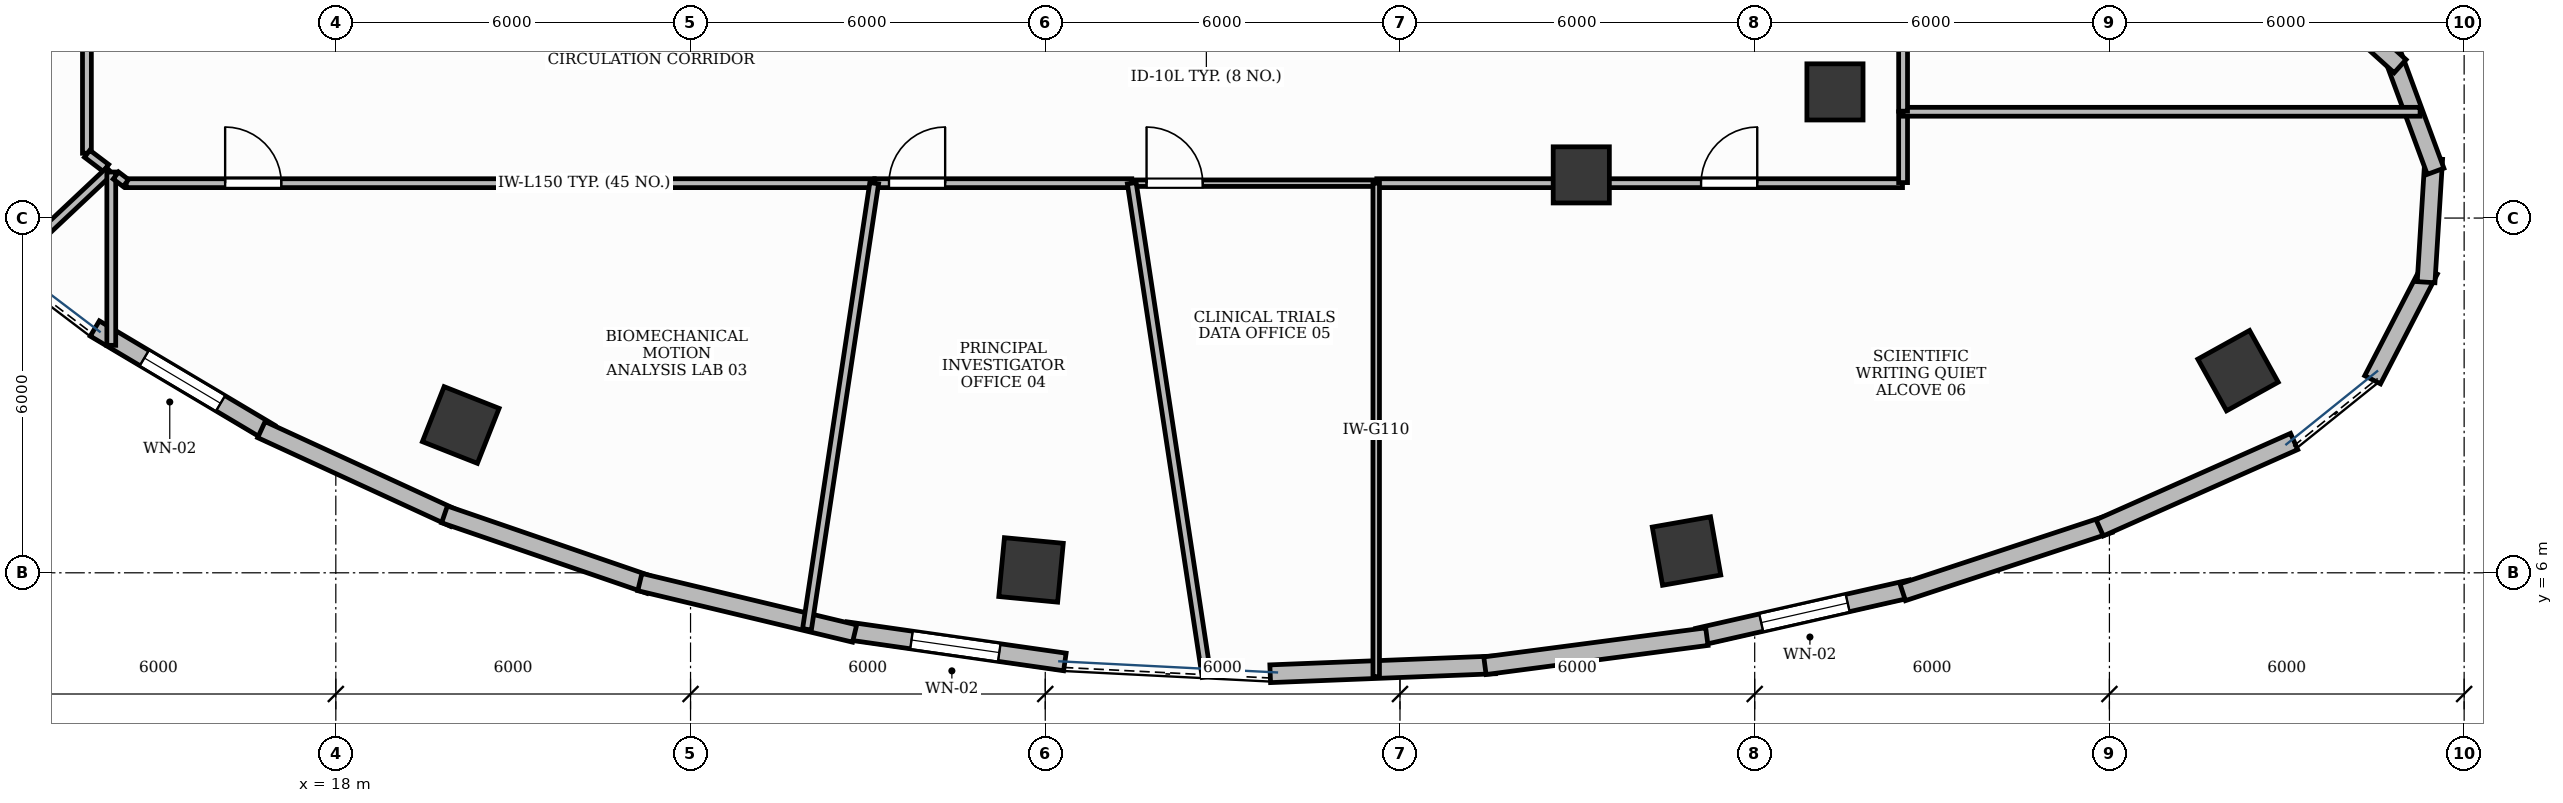
"""IFC4 building model, lengths in metres.
Left out: names, types, materials, properties, quantities, classifications, styles, units other than length and angle.
Written with IfcOpenShell. Run it as: python <this file> out.ifc"""

import sys

from ifc_helpers import new_model, si_unit, direction, frame, frame_2d, origin, origin_2d, place, context, subcontext, project, spatial, rectangle, extrude, element, fill, save


model = new_model("IFC4")
c1 = context("Model", 3, precision=1e-05, world=origin(), true_north=direction((0.0, 1.0)))
c2 = subcontext(c1, "Body", "Model", "MODEL_VIEW")
j1 = project(units=[si_unit("LENGTHUNIT", "METRE"), si_unit("PLANEANGLEUNIT", "RADIAN")], contexts=[c1])
p1 = place(None, origin())
s1 = spatial("IfcSite", under=j1, at=p1, CompositionType="ELEMENT")
p2 = place(p1, origin())
s2 = spatial("IfcBuilding", under=s1, at=p2, CompositionType="ELEMENT")
p3 = place(p2, frame((0.0, 0.0, 235.2)))
s3 = spatial("IfcBuildingStorey", under=s2, at=p3, CompositionType="ELEMENT", Elevation=235.2)
for number, where, z_axis, x_axis in (
    (1, (20.113, 8.5, -0.0), (0.0, 0.0, 1.0), (-0.93, 0.367, 0.0)),
    (2, (29.759, 6.049, -0.0), (0.0, 0.0, 1.0), (-0.995, 0.095, 0.0)),
    (3, (40.847, 6.368, -0.0), (0.0, 0.0, 1.0), (0.985, 0.173, 0.0)),
):
    element("IfcColumn", number, at=place(p3, frame(where, z_axis=z_axis, x_axis=x_axis)), inside=s3, PredefinedType="COLUMN", context=c2, shape_type="SweptSolid", body=[
        extrude(rectangle(XDim=1.0, YDim=1.0, at=origin_2d()), origin(), (0.0, 0.0, 1.0), 3.901),
    ])
p4 = place(p3, frame((39.067, 12.73, -0.0), z_axis=(0.0, 0.0, 1.0), x_axis=(1.0, 0.0, 0.0)))
e4 = element("IfcColumn", 4, at=p4, inside=s3, PredefinedType="COLUMN", context=c2, shape_type="SweptSolid", body=[
    extrude(rectangle(XDim=0.95, YDim=0.95, at=origin_2d()), origin(), (0.0, 0.0, 1.0), 3.901),
])
p5 = place(p3, frame((50.176, 9.419, -0.0), z_axis=(0.0, 0.0, 1.0), x_axis=(0.874535078577, 0.484962262797, 0.0)))
e5 = element("IfcColumn", 5, at=p5, inside=s3, PredefinedType="COLUMN", context=c2, shape_type="SweptSolid", body=[
    extrude(rectangle(XDim=1.0, YDim=1.0, at=origin_2d()), origin(), (0.0, 0.0, 1.0), 3.901),
])
p6 = place(p3, frame((43.358, 14.134, -0.0), z_axis=(0.0, 0.0, 1.0), x_axis=(1.0, 0.0, 0.0)))
e6 = element("IfcColumn", 6, at=p6, inside=s3, PredefinedType="COLUMN", context=c2, shape_type="SweptSolid", body=[
    extrude(rectangle(XDim=0.95, YDim=0.95, at=origin_2d()), origin(), (0.0, 0.0, 1.0), 3.901),
])
p7 = place(p3, frame((13.923, 10.132, 0.0), z_axis=(0.0, 0.0, 1.0), x_axis=(0.859459434124, -0.511203952543, 0.0)))
e7 = element("IfcWall", 7, at=p7, inside=s3, PredefinedType="STANDARD", context=c2, shape_type="SweptSolid", body=[
    extrude(rectangle(XDim=3.45, YDim=0.3, at=frame_2d((1.725, 0.0))), origin(), (0.0, 0.0, 1.0), 3.9),
])
p8 = place(p7, frame((0.975, 0.0, 0.95)))
e8 = element("IfcOpeningElement", 8, at=p8, cuts=e7, PredefinedType="OPENING", context=c2, shape_type="SweptSolid", body=[
    extrude(rectangle(XDim=1.5, YDim=1.8, at=frame_2d((0.75, 0.9))), frame((0.0, 0.165, 0.0), z_axis=(0.0, -1.0, 0.0), x_axis=(1.0, 0.0, 0.0)), (0.0, 0.0, 1.0), 0.33),
])
p9 = place(p3, frame((26.628, 5.022, 0.0), z_axis=(0.0, 0.0, 1.0), x_axis=(0.989905072127, -0.14173195891, 0.0)))
e9 = element("IfcWall", 9, at=p9, inside=s3, PredefinedType="STANDARD", context=c2, shape_type="SweptSolid", body=[
    extrude(rectangle(XDim=3.741, YDim=0.3, at=frame_2d((1.871, 0.0))), origin(), (0.0, 0.0, 1.0), 3.9),
])
p10 = place(p9, frame((1.121, 0.0, 0.95)))
e10 = element("IfcOpeningElement", 10, at=p10, cuts=e9, PredefinedType="OPENING", context=c2, shape_type="SweptSolid", body=[
    extrude(rectangle(XDim=1.5, YDim=1.8, at=frame_2d((0.75, 0.9))), frame((0.0, 0.165, 0.0), z_axis=(0.0, -1.0, 0.0), x_axis=(1.0, 0.0, 0.0)), (0.0, 0.0, 1.0), 0.33),
])
p11 = place(p3, frame((41.036, 4.914, 0.0), z_axis=(0.0, 0.0, 1.0), x_axis=(0.975237678872, 0.221159376263, 0.0)))
e11 = element("IfcWall", 11, at=p11, inside=s3, PredefinedType="STANDARD", context=c2, shape_type="SweptSolid", body=[
    extrude(rectangle(XDim=3.703, YDim=0.3, at=frame_2d((1.851, 0.0))), origin(), (0.0, 0.0, 1.0), 3.9),
])
p12 = place(p11, frame((1.101, 0.0, 0.95)))
e12 = element("IfcOpeningElement", 12, at=p12, cuts=e11, PredefinedType="OPENING", context=c2, shape_type="SweptSolid", body=[
    extrude(rectangle(XDim=1.5, YDim=1.8, at=frame_2d((0.75, 0.9))), frame((0.0, 0.165, 0.0), z_axis=(0.0, -1.0, 0.0), x_axis=(1.0, 0.0, 0.0)), (0.0, 0.0, 1.0), 0.33),
])
p13 = place(p3, frame((16.741, 8.422, 0.0), z_axis=(0.0, 0.0, 1.0), x_axis=(0.908506474671, -0.417870776055, 0.0)))
e13 = element("IfcWall", 13, at=p13, inside=s3, PredefinedType="STANDARD", context=c2, shape_type="SweptSolid", body=[
    extrude(rectangle(XDim=3.587, YDim=0.3, at=frame_2d((1.793, 0.0))), origin(), (0.0, 0.0, 1.0), 3.47),
])
p14 = place(p3, frame((19.838, 6.988, 0.0), z_axis=(0.0, 0.0, 1.0), x_axis=(0.945722383555, -0.32497565023, 0.0)))
e14 = element("IfcWall", 14, at=p14, inside=s3, PredefinedType="STANDARD", context=c2, shape_type="SweptSolid", body=[
    extrude(rectangle(XDim=3.67, YDim=0.3, at=frame_2d((1.835, 0.0))), origin(), (0.0, 0.0, 1.0), 3.9),
])
p15 = place(p3, frame((23.143, 5.843, 0.0), z_axis=(0.0, 0.0, 1.0), x_axis=(0.972475629939, -0.233004611918, 0.0)))
e15 = element("IfcWall", 15, at=p15, inside=s3, PredefinedType="STANDARD", context=c2, shape_type="SweptSolid", body=[
    extrude(rectangle(XDim=3.735, YDim=0.3, at=frame_2d((1.868, 0.0))), origin(), (0.0, 0.0, 1.0), 3.9),
])
p16 = place(p3, frame((33.805, 4.292, 0.0), z_axis=(0.0, 0.0, 1.0), x_axis=(0.999221923177, 0.039440439173, 0.0)))
e16 = element("IfcWall", 16, at=p16, inside=s3, PredefinedType="STANDARD", context=c2, shape_type="SweptSolid", body=[
    extrude(rectangle(XDim=3.807, YDim=0.3, at=frame_2d((1.903, 0.0))), origin(), (0.0, 0.0, 1.0), 3.9),
])
p17 = place(p3, frame((37.437, 4.428, 0.0), z_axis=(0.0, 0.0, 1.0), x_axis=(0.991512801574, 0.130009093201, 0.0)))
e17 = element("IfcWall", 17, at=p17, inside=s3, PredefinedType="STANDARD", context=c2, shape_type="SweptSolid", body=[
    extrude(rectangle(XDim=3.786, YDim=0.3, at=frame_2d((1.893, 0.0))), origin(), (0.0, 0.0, 1.0), 3.9),
])
p18 = place(p3, frame((44.504, 5.671, 0.0), z_axis=(0.0, 0.0, 1.0), x_axis=(0.94972655205, 0.313080622734, 0.0)))
e18 = element("IfcWall", 18, at=p18, inside=s3, PredefinedType="STANDARD", context=c2, shape_type="SweptSolid", body=[
    extrude(rectangle(XDim=3.679, YDim=0.3, at=frame_2d((1.84, 0.0))), origin(), (0.0, 0.0, 1.0), 3.9),
])
p19 = place(p3, frame((47.836, 6.761, 0.0), z_axis=(0.0, 0.0, 1.0), x_axis=(0.913940198441, 0.405848880341, 0.0)))
e19 = element("IfcWall", 19, at=p19, inside=s3, PredefinedType="STANDARD", context=c2, shape_type="SweptSolid", body=[
    extrude(rectangle(XDim=3.598, YDim=0.3, at=frame_2d((1.799, 0.0))), origin(), (0.0, 0.0, 1.0), 3.9),
])
p20 = place(p3, frame((52.452, 9.265, 0.0), z_axis=(0.0, 0.0, 1.0), x_axis=(0.459683297138, 0.888082916361, 0.0)))
e20 = element("IfcWall", 20, at=p20, inside=s3, PredefinedType="STANDARD", context=c2, shape_type="SweptSolid", body=[
    extrude(rectangle(XDim=2.092, YDim=0.3, at=frame_2d((1.046, 0.0))), origin(), (0.0, 0.0, 1.0), 3.9),
])
for number, where, z_axis, x_axis in (
    (21, (53.356, 10.915, 0.0), (0.0, 0.0, 1.0), (0.062, 0.998, 0.0)),
    (22, (53.517, 12.791, 0.0), (0.0, 0.0, 1.0), (-0.346, 0.938, 0.0)),
):
    element("IfcWall", number, at=place(p3, frame(where, z_axis=z_axis, x_axis=x_axis)), inside=s3, PredefinedType="STANDARD", context=c2, shape_type="SweptSolid", body=[
        extrude(rectangle(XDim=2.091, YDim=0.3, at=frame_2d((1.046, 0.0))), origin(), (0.0, 0.0, 1.0), 3.9),
    ])
p21 = place(p3, frame((52.917, 14.569, 0.0), z_axis=(0.0, 0.0, 1.0), x_axis=(-0.742037796493, 0.670358045059, 0.0)))
e23 = element("IfcWall", 23, at=p21, inside=s3, PredefinedType="STANDARD", context=c2, shape_type="SweptSolid", body=[
    extrude(rectangle(XDim=3.685, YDim=0.3, at=frame_2d((1.843, 0.0))), origin(), (0.0, 0.0, 1.0), 3.9),
])
p22 = place(p3, frame((13.79, 21.79, 0.0), z_axis=(0.0, 0.0, 1.0), x_axis=(0.0, -1.0, 0.0)))
e24 = element("IfcWall", 24, at=p22, inside=s3, PredefinedType="PARTITIONING", context=c2, shape_type="SweptSolid", body=[
    extrude(rectangle(XDim=8.694, YDim=0.15, at=frame_2d((4.347, 0.0))), origin(), (0.0, 0.0, 1.0), 2.91),
])
p23 = place(p22, frame((0.24, 0.0, 0.0)))
e25 = element("IfcOpeningElement", 25, at=p23, cuts=e24, PredefinedType="OPENING", context=c2, shape_type="SweptSolid", body=[
    extrude(rectangle(XDim=0.95, YDim=2.15, at=frame_2d((0.475, 1.075))), frame((0.0, 0.09, 0.0), z_axis=(0.0, -1.0, 0.0), x_axis=(1.0, 0.0, 0.0)), (0.0, 0.0, 1.0), 0.18),
])
p24 = place(p3, frame((14.454, 12.59, 0.0), z_axis=(0.0, 0.0, 1.0), x_axis=(1.0, 0.0, 0.0)))
e26 = element("IfcWall", 26, at=p24, inside=s3, PredefinedType="PARTITIONING", context=c2, shape_type="SweptSolid", body=[
    extrude(rectangle(XDim=12.652, YDim=0.15, at=frame_2d((6.326, 0.0))), origin(), (0.0, 0.0, 1.0), 2.91),
])
p25 = place(p24, frame((1.673, 0.0, 0.0)))
e27 = element("IfcOpeningElement", 27, at=p25, cuts=e26, PredefinedType="OPENING", context=c2, shape_type="SweptSolid", body=[
    extrude(rectangle(XDim=0.95, YDim=2.15, at=frame_2d((0.475, 1.075))), frame((0.0, 0.09, 0.0), z_axis=(0.0, -1.0, 0.0), x_axis=(1.0, 0.0, 0.0)), (0.0, 0.0, 1.0), 0.18),
])
p26 = place(p3, frame((27.117, 12.59, 0.0), z_axis=(0.0, 0.0, 1.0), x_axis=(1.0, 0.0, 0.0)))
e28 = element("IfcWall", 28, at=p26, inside=s3, PredefinedType="PARTITIONING", context=c2, shape_type="SweptSolid", body=[
    extrude(rectangle(XDim=4.347, YDim=0.15, at=frame_2d((2.173, 0.0))), origin(), (0.0, 0.0, 1.0), 2.91),
])
p27 = place(p26, frame((0.24, 0.0, 0.0)))
e29 = element("IfcOpeningElement", 29, at=p27, cuts=e28, PredefinedType="OPENING", context=c2, shape_type="SweptSolid", body=[
    extrude(rectangle(XDim=0.95, YDim=2.15, at=frame_2d((0.475, 1.075))), frame((0.0, 0.09, 0.0), z_axis=(0.0, -1.0, 0.0), x_axis=(1.0, 0.0, 0.0)), (0.0, 0.0, 1.0), 0.18),
])
p28 = place(p3, frame((31.473, 12.59, 0.0), z_axis=(0.0, 0.0, 1.0), x_axis=(1.0, 0.0, 0.0)))
e30 = element("IfcWall", 30, at=p28, inside=s3, PredefinedType="MOVABLE", context=c2, shape_type="SweptSolid", body=[
    extrude(rectangle(XDim=4.125, YDim=0.11, at=frame_2d((2.062, 0.0))), origin(), (0.0, 0.0, 1.0), 2.91),
])
p29 = place(p28, frame((0.24, 0.0, 0.0)))
e31 = element("IfcOpeningElement", 31, at=p29, cuts=e30, PredefinedType="OPENING", context=c2, shape_type="SweptSolid", body=[
    extrude(rectangle(XDim=0.95, YDim=2.15, at=frame_2d((0.475, 1.075))), frame((0.0, 0.07, 0.0), z_axis=(0.0, -1.0, 0.0), x_axis=(1.0, 0.0, 0.0)), (0.0, 0.0, 1.0), 0.14),
])
p30 = place(p3, frame((35.608, 12.59, 0.0), z_axis=(0.0, 0.0, 1.0), x_axis=(1.0, 0.0, 0.0)))
e32 = element("IfcWall", 32, at=p30, inside=s3, PredefinedType="PARTITIONING", context=c2, shape_type="SweptSolid", body=[
    extrude(rectangle(XDim=8.892, YDim=0.15, at=frame_2d((4.446, 0.0))), origin(), (0.0, 0.0, 1.0), 2.91),
])
p31 = place(p30, frame((5.485, 0.0, 0.0)))
e33 = element("IfcOpeningElement", 33, at=p31, cuts=e32, PredefinedType="OPENING", context=c2, shape_type="SweptSolid", body=[
    extrude(rectangle(XDim=0.95, YDim=2.15, at=frame_2d((0.475, 1.075))), frame((0.0, 0.09, 0.0), z_axis=(0.0, -1.0, 0.0), x_axis=(1.0, 0.0, 0.0)), (0.0, 0.0, 1.0), 0.18),
])
p32 = place(p3, frame((13.794, 13.088, 0.0), z_axis=(0.0, 0.0, 1.0), x_axis=(0.797056485175, -0.60390476024, 0.0)))
e34 = element("IfcWall", 34, at=p32, inside=s3, PredefinedType="PARTITIONING", context=c2, shape_type="SweptSolid", body=[
    extrude(rectangle(XDim=0.399, YDim=0.15, at=frame_2d((0.2, 0.0))), origin(), (0.0, 0.0, 1.0), 2.91),
])
p33 = place(p3, frame((14.175, 12.799, 0.0), z_axis=(0.0, 0.0, 1.0), x_axis=(-0.728528819482, -0.685015152521, 0.0)))
e35 = element("IfcWall", 35, at=p33, inside=s3, PredefinedType="PARTITIONING", context=c2, shape_type="SweptSolid", body=[
    extrude(rectangle(XDim=2.441, YDim=0.15, at=frame_2d((1.22, 0.0))), origin(), (0.0, 0.0, 1.0), 2.91),
])
p34 = place(p3, frame((14.202, 9.847, 0.0), z_axis=(0.0, 0.0, 1.0), x_axis=(0.0, 1.0, 0.0)))
e36 = element("IfcWall", 36, at=p34, inside=s3, PredefinedType="PARTITIONING", context=c2, shape_type="SweptSolid", body=[
    extrude(rectangle(XDim=2.931, YDim=0.15, at=frame_2d((1.466, 0.0))), origin(), (0.0, 0.0, 1.0), 2.91),
])
p35 = place(p3, frame((14.28, 12.72, 0.0), z_axis=(0.0, 0.0, 1.0), x_axis=(0.796940505815, -0.604057803683, 0.0)))
e37 = element("IfcWall", 37, at=p35, inside=s3, PredefinedType="PARTITIONING", context=c2, shape_type="SweptSolid", body=[
    extrude(rectangle(XDim=0.211, YDim=0.15, at=frame_2d((0.106, 0.0))), origin(), (0.0, 0.0, 1.0), 2.91),
])
p36 = place(p3, frame((27.107, 12.59, 0.0), z_axis=(0.0, 0.0, 1.0), x_axis=(-0.149013085528, -0.98883522406, 0.0)))
e38 = element("IfcWall", 38, at=p36, inside=s3, PredefinedType="PARTITIONING", context=c2, shape_type="SweptSolid", body=[
    extrude(rectangle(XDim=7.632, YDim=0.15, at=frame_2d((3.816, 0.0))), origin(), (0.0, 0.0, 1.0), 2.91),
])
p37 = place(p3, frame((31.463, 12.59, 0.0), z_axis=(0.0, 0.0, 1.0), x_axis=(0.149927844007, -0.988696941227, 0.0)))
e39 = element("IfcWall", 39, at=p37, inside=s3, PredefinedType="PARTITIONING", context=c2, shape_type="SweptSolid", body=[
    extrude(rectangle(XDim=8.445, YDim=0.15, at=frame_2d((4.222, 0.0))), origin(), (0.0, 0.0, 1.0), 2.91),
])
p38 = place(p3, frame((35.598, 12.59, 0.0), z_axis=(0.0, 0.0, 1.0), x_axis=(0.0, -1.0, 0.0)))
e40 = element("IfcWall", 40, at=p38, inside=s3, PredefinedType="MOVABLE", context=c2, shape_type="SweptSolid", body=[
    extrude(rectangle(XDim=8.347, YDim=0.11, at=frame_2d((4.173, 0.0))), origin(), (0.0, 0.0, 1.0), 2.91),
])
p39 = place(p3, frame((44.51, 12.6, 0.0), z_axis=(0.0, 0.0, 1.0), x_axis=(0.0, 1.0, 0.0)))
e41 = element("IfcWall", 41, at=p39, inside=s3, PredefinedType="PARTITIONING", context=c2, shape_type="SweptSolid", body=[
    extrude(rectangle(XDim=1.198, YDim=0.15, at=frame_2d((0.599, 0.0))), origin(), (0.0, 0.0, 1.0), 2.91),
])
p40 = place(p3, frame((44.51, 13.798, 0.0), z_axis=(0.0, 0.0, 1.0), x_axis=(1.0, 0.0, 0.0)))
e42 = element("IfcWall", 42, at=p40, inside=s3, PredefinedType="PARTITIONING", context=c2, shape_type="SweptSolid", body=[
    extrude(rectangle(XDim=8.745, YDim=0.15, at=frame_2d((4.373, 0.0))), origin(), (0.0, 0.0, 1.0), 2.91),
])
p41 = place(p3, frame((44.51, 13.808, 0.0), z_axis=(0.0, 0.0, 1.0), x_axis=(0.0, 1.0, 0.0)))
e43 = element("IfcWall", 43, at=p41, inside=s3, PredefinedType="PARTITIONING", context=c2, shape_type="SweptSolid", body=[
    extrude(rectangle(XDim=2.592, YDim=0.15, at=frame_2d((1.296, 0.0))), origin(), (0.0, 0.0, 1.0), 2.91),
])
p42 = place(p8, origin())
e44 = element("IfcWindow", 44, at=p42, inside=s3, PartitioningType="DOUBLE_PANEL_VERTICAL", PredefinedType="WINDOW", context=c2, shape_type="SweptSolid", body=[
    extrude(rectangle(XDim=1.5, YDim=1.8, at=frame_2d((0.75, 0.9))), frame((0.0, 0.03, 0.0), z_axis=(0.0, -1.0, 0.0), x_axis=(1.0, 0.0, 0.0)), (0.0, 0.0, 1.0), 0.06),
])
fill(e8, e44)
p43 = place(p10, origin())
e45 = element("IfcWindow", 45, at=p43, inside=s3, PartitioningType="DOUBLE_PANEL_VERTICAL", PredefinedType="WINDOW", context=c2, shape_type="SweptSolid", body=[
    extrude(rectangle(XDim=1.5, YDim=1.8, at=frame_2d((0.75, 0.9))), frame((0.0, 0.03, 0.0), z_axis=(0.0, -1.0, 0.0), x_axis=(1.0, 0.0, 0.0)), (0.0, 0.0, 1.0), 0.06),
])
fill(e10, e45)
p44 = place(p12, origin())
e46 = element("IfcWindow", 46, at=p44, inside=s3, PartitioningType="DOUBLE_PANEL_VERTICAL", PredefinedType="WINDOW", context=c2, shape_type="SweptSolid", body=[
    extrude(rectangle(XDim=1.5, YDim=1.8, at=frame_2d((0.75, 0.9))), frame((0.0, 0.03, 0.0), z_axis=(0.0, -1.0, 0.0), x_axis=(1.0, 0.0, 0.0)), (0.0, 0.0, 1.0), 0.06),
])
fill(e12, e46)
p45 = place(p25, origin())
e47 = element("IfcDoor", 47, at=p45, inside=s3, OperationType="SINGLE_SWING_LEFT", PredefinedType="DOOR", context=c2, shape_type="SweptSolid", body=[
    extrude(rectangle(XDim=0.95, YDim=2.15, at=frame_2d((0.475, 1.075))), frame((0.0, 0.025, 0.0), z_axis=(0.0, -1.0, 0.0), x_axis=(1.0, 0.0, 0.0)), (0.0, 0.0, 1.0), 0.05),
])
fill(e27, e47)
p46 = place(p27, origin())
e48 = element("IfcDoor", 48, at=p46, inside=s3, OperationType="SINGLE_SWING_RIGHT", PredefinedType="DOOR", context=c2, shape_type="SweptSolid", body=[
    extrude(rectangle(XDim=0.95, YDim=2.15, at=frame_2d((0.475, 1.075))), frame((0.0, 0.025, 0.0), z_axis=(0.0, -1.0, 0.0), x_axis=(1.0, 0.0, 0.0)), (0.0, 0.0, 1.0), 0.05),
])
fill(e29, e48)
p47 = place(p29, origin())
e49 = element("IfcDoor", 49, at=p47, inside=s3, OperationType="SINGLE_SWING_LEFT", PredefinedType="DOOR", context=c2, shape_type="SweptSolid", body=[
    extrude(rectangle(XDim=0.95, YDim=2.15, at=frame_2d((0.475, 1.075))), frame((0.0, 0.025, 0.0), z_axis=(0.0, -1.0, 0.0), x_axis=(1.0, 0.0, 0.0)), (0.0, 0.0, 1.0), 0.05),
])
fill(e31, e49)
p48 = place(p31, origin())
e50 = element("IfcDoor", 50, at=p48, inside=s3, OperationType="SINGLE_SWING_RIGHT", PredefinedType="DOOR", context=c2, shape_type="SweptSolid", body=[
    extrude(rectangle(XDim=0.95, YDim=2.15, at=frame_2d((0.475, 1.075))), frame((0.0, 0.025, 0.0), z_axis=(0.0, -1.0, 0.0), x_axis=(1.0, 0.0, 0.0)), (0.0, 0.0, 1.0), 0.05),
])
fill(e33, e50)
save(model, sys.argv[1])
